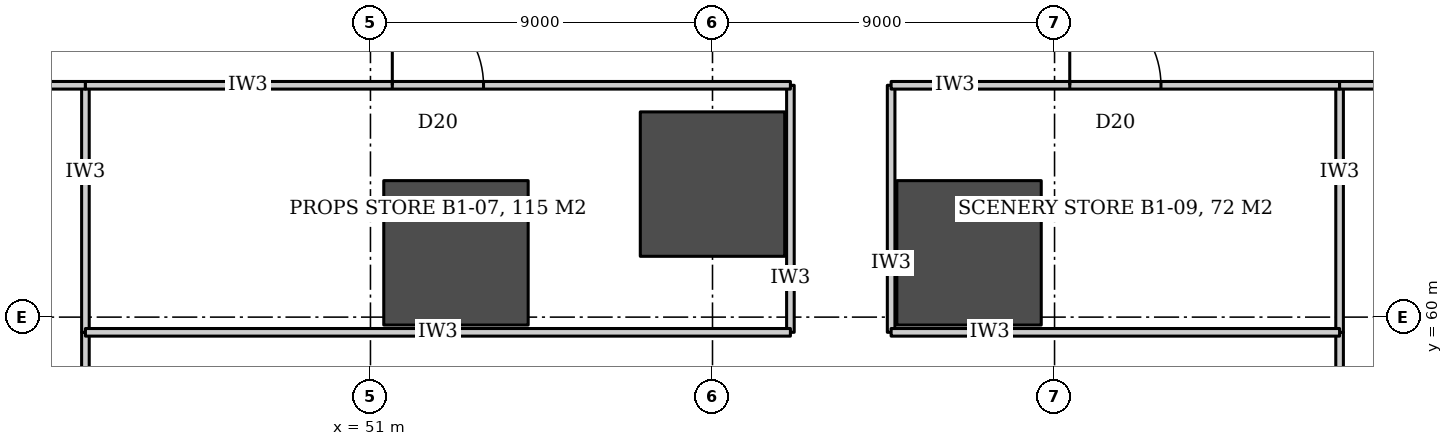
"""IFC4 building model, lengths in metres.
Left out: names, types, materials, properties, quantities, classifications, styles, units other than length and angle.
Written with IfcOpenShell. Run it as: python <this file> out.ifc"""

import sys

from ifc_helpers import new_model, si_unit, direction, frame, frame_2d, origin, origin_2d, place, context, subcontext, project, spatial, rectangle, circle, extrude, element, fill, save


model = new_model("IFC4")
c1 = context("Model", 3, precision=1e-05, world=origin(), true_north=direction((0.0, 1.0)))
c2 = subcontext(c1, "Body", "Model", "MODEL_VIEW")
j1 = project(units=[si_unit("LENGTHUNIT", "METRE"), si_unit("PLANEANGLEUNIT", "RADIAN")], contexts=[c1])
p1 = place(None, origin())
s1 = spatial("IfcSite", under=j1, at=p1, CompositionType="ELEMENT")
p2 = place(p1, origin())
s2 = spatial("IfcBuilding", under=s1, at=p2, CompositionType="ELEMENT")
p3 = place(p2, frame((0.0, 0.0, -6.0)))
s3 = spatial("IfcBuildingStorey", under=s2, at=p3, CompositionType="ELEMENT", Elevation=-6.0)
for number, where, z_axis, x_axis in (
    (1, (66.75, 61.691, 0.0), (0.0, 0.0, 1.0), (1.0, 0.0, 0.0)),
    (2, (60.0, 63.5, 0.0), (0.0, 0.0, 1.0), (1.0, 0.0, 0.0)),
    (3, (53.25, 61.691, 0.0), (0.0, 0.0, 1.0), (1.0, 0.0, 0.0)),
):
    element("IfcColumn", number, at=place(p3, frame(where, z_axis=z_axis, x_axis=x_axis)), inside=s3, PredefinedType="COLUMN", context=c2, shape_type="SweptSolid", body=[
        extrude(circle(Radius=1.9, at=origin_2d()), origin(), (0.0, 0.0, 1.0), 6.0),
    ])
p4 = place(p3, frame((43.5, 40.4, 0.0), z_axis=(0.0, 0.0, 1.0), x_axis=(0.0, 1.0, 0.0)))
e4 = element("IfcWall", 4, at=p4, inside=s3, PredefinedType="PARTITIONING", context=c2, shape_type="SweptSolid", body=[
    extrude(rectangle(XDim=19.2, YDim=0.2, at=frame_2d((9.6, 0.0))), origin(), (0.0, 0.0, 1.0), 3.08),
])
p5 = place(p4, frame((9.1, 0.0, 0.0)))
e5 = element("IfcOpeningElement", 5, at=p5, cuts=e4, PredefinedType="OPENING", context=c2, shape_type="SweptSolid", body=[
    extrude(rectangle(XDim=1.0, YDim=2.1, at=frame_2d((0.5, 1.05))), frame((0.0, 0.11, 0.0), z_axis=(0.0, -1.0, 0.0), x_axis=(1.0, 0.0, 0.0)), (0.0, 0.0, 1.0), 0.22),
])
for number, where, z_axis, x_axis in (
    (6, (43.5, 59.6, 0.0), (0.0, 0.0, 1.0), (0.0, 1.0, 0.0)),
    (7, (62.05, 59.6, 0.0), (0.0, 0.0, 1.0), (0.0, 1.0, 0.0)),
):
    element("IfcWall", number, at=place(p3, frame(where, z_axis=z_axis, x_axis=x_axis)), inside=s3, PredefinedType="PARTITIONING", context=c2, shape_type="SweptSolid", body=[
        extrude(rectangle(XDim=6.5, YDim=0.2, at=frame_2d((3.25, 0.0))), origin(), (0.0, 0.0, 1.0), 3.08),
    ])
p6 = place(p3, frame((64.7, 59.6, 0.0), z_axis=(0.0, 0.0, 1.0), x_axis=(0.0, 1.0, 0.0)))
e8 = element("IfcWall", 8, at=p6, inside=s3, PredefinedType="PARTITIONING", context=c2, shape_type="SweptSolid", body=[
    extrude(rectangle(XDim=6.5, YDim=0.2, at=frame_2d((3.25, 0.0))), origin(), (0.0, 0.0, 1.0), 2.48),
])
p7 = place(p3, frame((76.5, 40.4, 0.0), z_axis=(0.0, 0.0, 1.0), x_axis=(0.0, 1.0, 0.0)))
e9 = element("IfcWall", 9, at=p7, inside=s3, PredefinedType="PARTITIONING", context=c2, shape_type="SweptSolid", body=[
    extrude(rectangle(XDim=19.2, YDim=0.2, at=frame_2d((9.6, 0.0))), origin(), (0.0, 0.0, 1.0), 3.08),
])
p8 = place(p7, frame((9.1, 0.0, 0.0)))
e10 = element("IfcOpeningElement", 10, at=p8, cuts=e9, PredefinedType="OPENING", context=c2, shape_type="SweptSolid", body=[
    extrude(rectangle(XDim=1.0, YDim=2.1, at=frame_2d((0.5, 1.05))), frame((0.0, 0.11, 0.0), z_axis=(0.0, -1.0, 0.0), x_axis=(1.0, 0.0, 0.0)), (0.0, 0.0, 1.0), 0.22),
])
p9 = place(p3, frame((76.5, 59.6, 0.0), z_axis=(0.0, 0.0, 1.0), x_axis=(0.0, 1.0, 0.0)))
e11 = element("IfcWall", 11, at=p9, inside=s3, PredefinedType="PARTITIONING", context=c2, shape_type="SweptSolid", body=[
    extrude(rectangle(XDim=6.5, YDim=0.2, at=frame_2d((3.25, 0.0))), origin(), (0.0, 0.0, 1.0), 3.08),
])
p10 = place(p3, frame((43.5, 59.6, 0.0), z_axis=(0.0, 0.0, 1.0), x_axis=(1.0, 0.0, 0.0)))
e12 = element("IfcWall", 12, at=p10, inside=s3, PredefinedType="PARTITIONING", context=c2, shape_type="SweptSolid", body=[
    extrude(rectangle(XDim=18.55, YDim=0.2, at=frame_2d((9.275, 0.0))), origin(), (0.0, 0.0, 1.0), 2.48),
])
p11 = place(p3, frame((64.7, 59.6, 0.0), z_axis=(0.0, 0.0, 1.0), x_axis=(1.0, 0.0, 0.0)))
e13 = element("IfcWall", 13, at=p11, inside=s3, PredefinedType="PARTITIONING", context=c2, shape_type="SweptSolid", body=[
    extrude(rectangle(XDim=11.8, YDim=0.2, at=frame_2d((5.9, 0.0))), origin(), (0.0, 0.0, 1.0), 2.48),
])
p12 = place(p3, frame((30.9, 66.1, 0.0), z_axis=(0.0, 0.0, 1.0), x_axis=(1.0, 0.0, 0.0)))
e14 = element("IfcWall", 14, at=p12, inside=s3, PredefinedType="PARTITIONING", context=c2, shape_type="SweptSolid", body=[
    extrude(rectangle(XDim=12.6, YDim=0.2, at=frame_2d((6.3, 0.0))), origin(), (0.0, 0.0, 1.0), 3.68),
])
p13 = place(p3, frame((43.5, 66.1, 0.0), z_axis=(0.0, 0.0, 1.0), x_axis=(1.0, 0.0, 0.0)))
e15 = element("IfcWall", 15, at=p13, inside=s3, PredefinedType="PARTITIONING", context=c2, shape_type="SweptSolid", body=[
    extrude(rectangle(XDim=18.55, YDim=0.2, at=frame_2d((9.275, 0.0))), origin(), (0.0, 0.0, 1.0), 3.08),
])
p14 = place(p13, frame((8.075, 0.0, 0.0)))
e16 = element("IfcOpeningElement", 16, at=p14, cuts=e15, PredefinedType="OPENING", context=c2, shape_type="SweptSolid", body=[
    extrude(rectangle(XDim=2.4, YDim=2.7, at=frame_2d((1.2, 1.35))), frame((0.0, 0.11, 0.0), z_axis=(0.0, -1.0, 0.0), x_axis=(1.0, 0.0, 0.0)), (0.0, 0.0, 1.0), 0.22),
])
p15 = place(p3, frame((64.7, 66.1, 0.0), z_axis=(0.0, 0.0, 1.0), x_axis=(1.0, 0.0, 0.0)))
e17 = element("IfcWall", 17, at=p15, inside=s3, PredefinedType="PARTITIONING", context=c2, shape_type="SweptSolid", body=[
    extrude(rectangle(XDim=11.8, YDim=0.2, at=frame_2d((5.9, 0.0))), origin(), (0.0, 0.0, 1.0), 3.08),
])
p16 = place(p15, frame((4.7, 0.0, 0.0)))
e18 = element("IfcOpeningElement", 18, at=p16, cuts=e17, PredefinedType="OPENING", context=c2, shape_type="SweptSolid", body=[
    extrude(rectangle(XDim=2.4, YDim=2.7, at=frame_2d((1.2, 1.35))), frame((0.0, 0.11, 0.0), z_axis=(0.0, -1.0, 0.0), x_axis=(1.0, 0.0, 0.0)), (0.0, 0.0, 1.0), 0.22),
])
p17 = place(p3, frame((76.5, 66.1, 0.0), z_axis=(0.0, 0.0, 1.0), x_axis=(1.0, 0.0, 0.0)))
e19 = element("IfcWall", 19, at=p17, inside=s3, PredefinedType="PARTITIONING", context=c2, shape_type="SweptSolid", body=[
    extrude(rectangle(XDim=12.6, YDim=0.2, at=frame_2d((6.3, 0.0))), origin(), (0.0, 0.0, 1.0), 3.68),
])
p18 = place(p14, origin())
e20 = element("IfcDoor", 20, at=p18, inside=s3, OperationType="DOUBLE_DOOR_DOUBLE_SWING", PredefinedType="DOOR", context=c2, shape_type="SweptSolid", body=[
    extrude(rectangle(XDim=2.4, YDim=2.7, at=frame_2d((1.2, 1.35))), frame((0.0, 0.025, 0.0), z_axis=(0.0, -1.0, 0.0), x_axis=(1.0, 0.0, 0.0)), (0.0, 0.0, 1.0), 0.05),
])
fill(e16, e20)
p19 = place(p16, origin())
e21 = element("IfcDoor", 21, at=p19, inside=s3, OperationType="DOUBLE_DOOR_DOUBLE_SWING", PredefinedType="DOOR", context=c2, shape_type="SweptSolid", body=[
    extrude(rectangle(XDim=2.4, YDim=2.7, at=frame_2d((1.2, 1.35))), frame((0.0, 0.025, 0.0), z_axis=(0.0, -1.0, 0.0), x_axis=(1.0, 0.0, 0.0)), (0.0, 0.0, 1.0), 0.05),
])
fill(e18, e21)
save(model, sys.argv[1])
